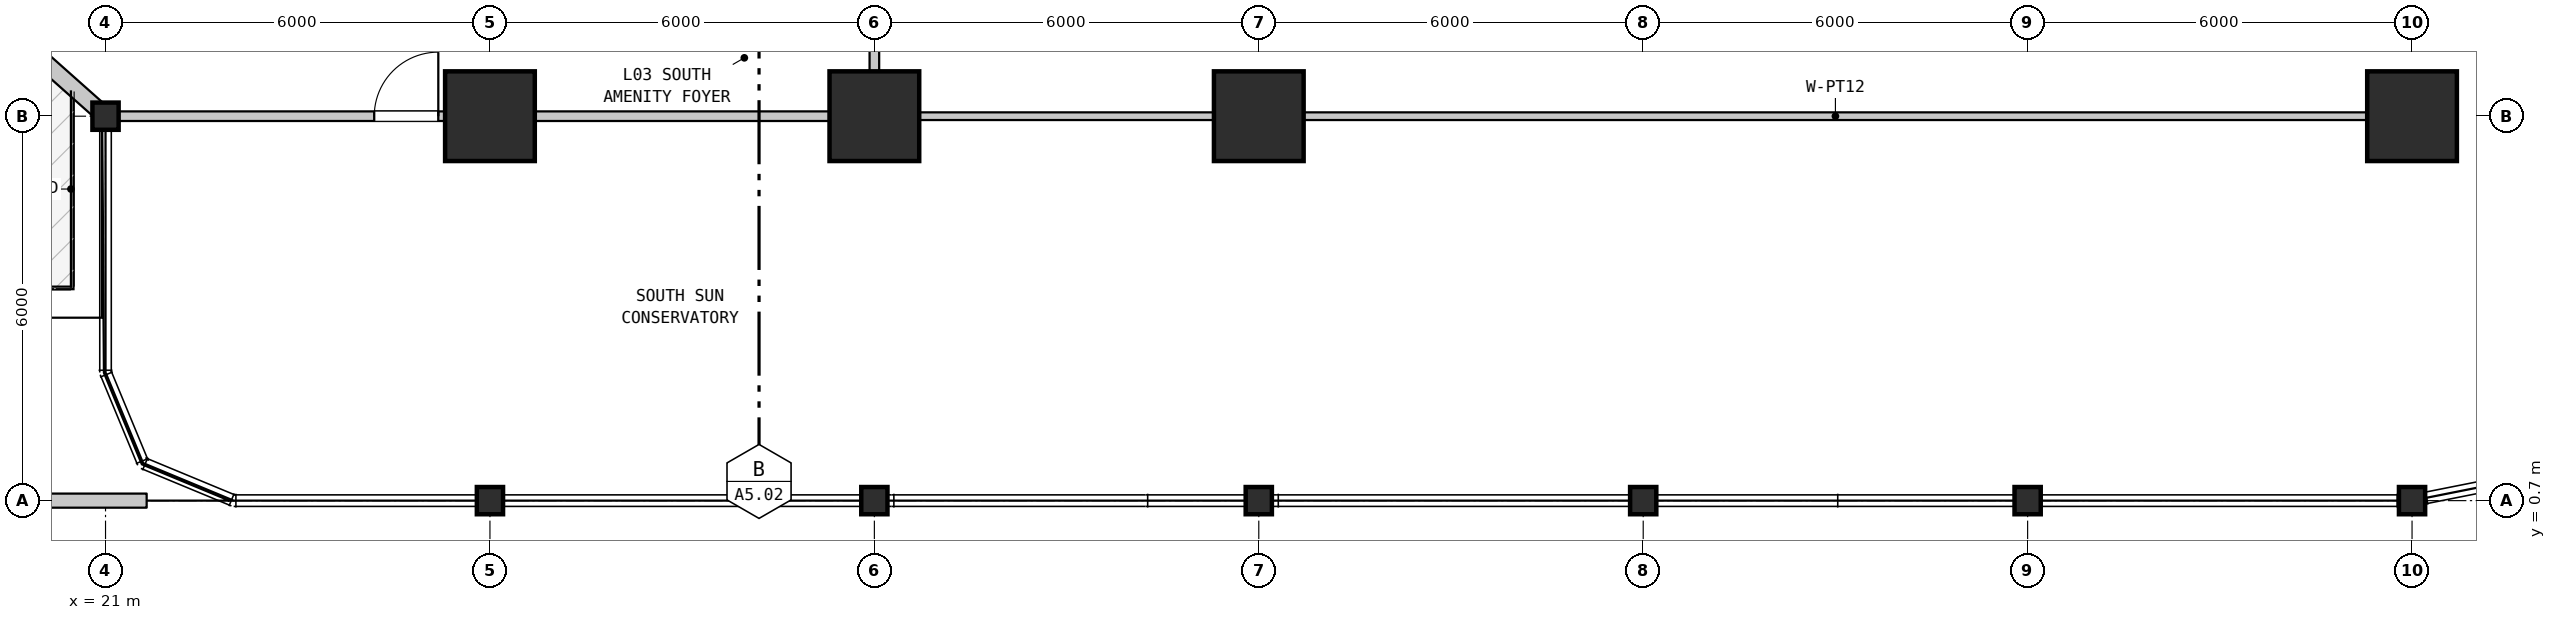
"""IFC4 building model, lengths in metres.
Left out: names, types, materials, properties, quantities, classifications, styles, units other than length and angle.
Written with IfcOpenShell. Run it as: python <this file> out.ifc"""

import sys

from ifc_helpers import new_model, si_unit, direction, frame, frame_2d, origin, origin_2d, place, context, subcontext, project, spatial, rectangle, i_section, extrude, element, fill, save


model = new_model("IFC4")
c1 = context("Model", 3, precision=1e-05, world=origin(), true_north=direction((0.0, 1.0)))
c2 = subcontext(c1, "Body", "Model", "MODEL_VIEW")
j1 = project(units=[si_unit("LENGTHUNIT", "METRE"), si_unit("PLANEANGLEUNIT", "RADIAN")], contexts=[c1])
p1 = place(None, origin())
s1 = spatial("IfcSite", under=j1, at=p1, CompositionType="ELEMENT")
p2 = place(p1, origin())
s2 = spatial("IfcBuilding", under=s1, at=p2, CompositionType="ELEMENT")
p3 = place(p2, frame((0.0, 0.0, 19.0)))
s3 = spatial("IfcBuildingStorey", under=s2, at=p3, CompositionType="ELEMENT", Elevation=19.0)
for number, where, z_axis, x_axis in (
    (1, (21.0, 6.7, 0.0), (0.0, 0.0, 1.0), (1.0, 0.0, 0.0)),
    (2, (27.0, 0.7, 0.0), (0.0, 0.0, 1.0), (1.0, 0.0, 0.0)),
):
    element("IfcColumn", number, at=place(p3, frame(where, z_axis=z_axis, x_axis=x_axis)), inside=s3, PredefinedType="COLUMN", context=c2, shape_type="SweptSolid", body=[
        extrude(i_section(OverallWidth=0.409, OverallDepth=0.425, WebThickness=0.032, FlangeThickness=0.052, FilletRadius=0.015, at=origin_2d()), origin(), (0.0, 0.0, 1.0), 5.0),
    ])
p4 = place(p3, frame((27.0, 6.7, 0.0), z_axis=(0.0, 0.0, 1.0), x_axis=(1.0, 0.0, 0.0)))
e3 = element("IfcColumn", 3, at=p4, inside=s3, PredefinedType="COLUMN", context=c2, shape_type="SweptSolid", body=[
    extrude(rectangle(XDim=1.4, YDim=1.4, at=origin_2d()), origin(), (0.0, 0.0, 1.0), 5.0),
])
p5 = place(p3, frame((33.0, 0.7, 0.0), z_axis=(0.0, 0.0, 1.0), x_axis=(1.0, 0.0, 0.0)))
e4 = element("IfcColumn", 4, at=p5, inside=s3, PredefinedType="COLUMN", context=c2, shape_type="SweptSolid", body=[
    extrude(i_section(OverallWidth=0.409, OverallDepth=0.425, WebThickness=0.032, FlangeThickness=0.052, FilletRadius=0.015, at=origin_2d()), origin(), (0.0, 0.0, 1.0), 5.0),
])
p6 = place(p3, frame((33.0, 6.7, 0.0), z_axis=(0.0, 0.0, 1.0), x_axis=(1.0, 0.0, 0.0)))
e5 = element("IfcColumn", 5, at=p6, inside=s3, PredefinedType="COLUMN", context=c2, shape_type="SweptSolid", body=[
    extrude(rectangle(XDim=1.4, YDim=1.4, at=origin_2d()), origin(), (0.0, 0.0, 1.0), 5.0),
])
p7 = place(p3, frame((39.0, 0.7, 0.0), z_axis=(0.0, 0.0, 1.0), x_axis=(1.0, 0.0, 0.0)))
e6 = element("IfcColumn", 6, at=p7, inside=s3, PredefinedType="COLUMN", context=c2, shape_type="SweptSolid", body=[
    extrude(i_section(OverallWidth=0.409, OverallDepth=0.425, WebThickness=0.032, FlangeThickness=0.052, FilletRadius=0.015, at=origin_2d()), origin(), (0.0, 0.0, 1.0), 5.0),
])
p8 = place(p3, frame((39.0, 6.7, 0.0), z_axis=(0.0, 0.0, 1.0), x_axis=(1.0, 0.0, 0.0)))
e7 = element("IfcColumn", 7, at=p8, inside=s3, PredefinedType="COLUMN", context=c2, shape_type="SweptSolid", body=[
    extrude(rectangle(XDim=1.4, YDim=1.4, at=origin_2d()), origin(), (0.0, 0.0, 1.0), 5.0),
])
for number, where, z_axis, x_axis in (
    (8, (45.0, 0.7, 0.0), (0.0, 0.0, 1.0), (1.0, 0.0, 0.0)),
    (9, (51.0, 0.7, 0.0), (0.0, 0.0, 1.0), (1.0, 0.0, 0.0)),
    (10, (57.0, 0.7, 0.0), (0.0, 0.0, 1.0), (1.0, 0.0, 0.0)),
):
    element("IfcColumn", number, at=place(p3, frame(where, z_axis=z_axis, x_axis=x_axis)), inside=s3, PredefinedType="COLUMN", context=c2, shape_type="SweptSolid", body=[
        extrude(i_section(OverallWidth=0.409, OverallDepth=0.425, WebThickness=0.032, FlangeThickness=0.052, FilletRadius=0.015, at=origin_2d()), origin(), (0.0, 0.0, 1.0), 5.0),
    ])
p9 = place(p3, frame((57.0, 6.7, 0.0), z_axis=(0.0, 0.0, 1.0), x_axis=(1.0, 0.0, 0.0)))
e11 = element("IfcColumn", 11, at=p9, inside=s3, PredefinedType="COLUMN", context=c2, shape_type="SweptSolid", body=[
    extrude(rectangle(XDim=1.4, YDim=1.4, at=origin_2d()), origin(), (0.0, 0.0, 1.0), 5.0),
])
p10 = place(p3, frame((21.0, 6.7, 0.0), z_axis=(0.0, 0.0, 1.0), x_axis=(-0.747409318684, 0.66436383883, 0.0)))
e12 = element("IfcWall", 12, at=p10, inside=s3, PredefinedType="STANDARD", context=c2, shape_type="SweptSolid", body=[
    extrude(rectangle(XDim=4.495, YDim=0.26, at=frame_2d((2.248, 0.0))), origin(), (0.0, 0.0, 1.0), 4.285),
])
p11 = place(p10, frame((1.367, 0.0, 0.9)))
e13 = element("IfcOpeningElement", 13, at=p11, cuts=e12, PredefinedType="OPENING", context=c2, shape_type="SweptSolid", body=[
    extrude(rectangle(XDim=1.4, YDim=1.85, at=frame_2d((0.7, 0.925))), frame((0.0, 0.14, 0.0), z_axis=(0.0, -1.0, 0.0), x_axis=(1.0, 0.0, 0.0)), (0.0, 0.0, 1.0), 0.28),
])
p12 = place(p3, frame((21.642, 0.7, 0.0), z_axis=(0.0, 0.0, 1.0), x_axis=(-1.0, 0.0, 0.0)))
e14 = element("IfcWall", 14, at=p12, inside=s3, PredefinedType="PARAPET", context=c2, shape_type="SweptSolid", body=[
    extrude(rectangle(XDim=17.228, YDim=0.22, at=frame_2d((8.614, 0.0))), origin(), (0.0, 0.0, 1.0), 0.55),
])
p13 = place(p3, frame((33.0, 6.7, 0.0), z_axis=(0.0, 0.0, 1.0), x_axis=(0.0, 1.0, 0.0)))
e15 = element("IfcWall", 15, at=p13, inside=s3, PredefinedType="STANDARD", context=c2, shape_type="SweptSolid", body=[
    extrude(rectangle(XDim=19.2, YDim=0.15, at=frame_2d((9.6, 0.0))), origin(), (0.0, 0.0, 1.0), 4.185),
])
p14 = place(p3, frame((21.01, 6.7, 0.0), z_axis=(0.0, 0.0, 1.0), x_axis=(1.0, 0.0, 0.0)))
e16 = element("IfcWall", 16, at=p14, inside=s3, PredefinedType="STANDARD", context=c2, shape_type="SweptSolid", body=[
    extrude(rectangle(XDim=11.93, YDim=0.15, at=frame_2d((5.965, 0.0))), origin(), (0.0, 0.0, 1.0), 4.185),
])
p15 = place(p14, frame((4.184, 0.0, 0.0)))
e17 = element("IfcOpeningElement", 17, at=p15, cuts=e16, PredefinedType="OPENING", context=c2, shape_type="SweptSolid", body=[
    extrude(rectangle(XDim=1.0, YDim=2.15, at=frame_2d((0.5, 1.075))), frame((0.0, 0.085, 0.0), z_axis=(0.0, -1.0, 0.0), x_axis=(1.0, 0.0, 0.0)), (0.0, 0.0, 1.0), 0.17),
])
p16 = place(p3, frame((33.06, 6.7, 0.0), z_axis=(0.0, 0.0, 1.0), x_axis=(1.0, 0.0, 0.0)))
e18 = element("IfcWall", 18, at=p16, inside=s3, PredefinedType="PARTITIONING", context=c2, shape_type="SweptSolid", body=[
    extrude(rectangle(XDim=5.94, YDim=0.12, at=frame_2d((2.97, 0.0))), origin(), (0.0, 0.0, 1.0), 4.185),
])
p17 = place(p3, frame((39.0, 6.7, 0.0), z_axis=(0.0, 0.0, 1.0), x_axis=(1.0, 0.0, 0.0)))
e19 = element("IfcWall", 19, at=p17, inside=s3, PredefinedType="PARTITIONING", context=c2, shape_type="SweptSolid", body=[
    extrude(rectangle(XDim=18.0, YDim=0.12, at=frame_2d((9.0, 0.0))), origin(), (0.0, 0.0, 1.0), 4.085),
])
p18 = place(p15, origin())
e20 = element("IfcDoor", 20, at=p18, inside=s3, OperationType="SINGLE_SWING_RIGHT", PredefinedType="DOOR", context=c2, shape_type="SweptSolid", body=[
    extrude(rectangle(XDim=1.0, YDim=2.15, at=frame_2d((0.5, 1.075))), frame((0.0, 0.025, 0.0), z_axis=(0.0, -1.0, 0.0), x_axis=(1.0, 0.0, 0.0)), (0.0, 0.0, 1.0), 0.05),
])
fill(e17, e20)
save(model, sys.argv[1])
